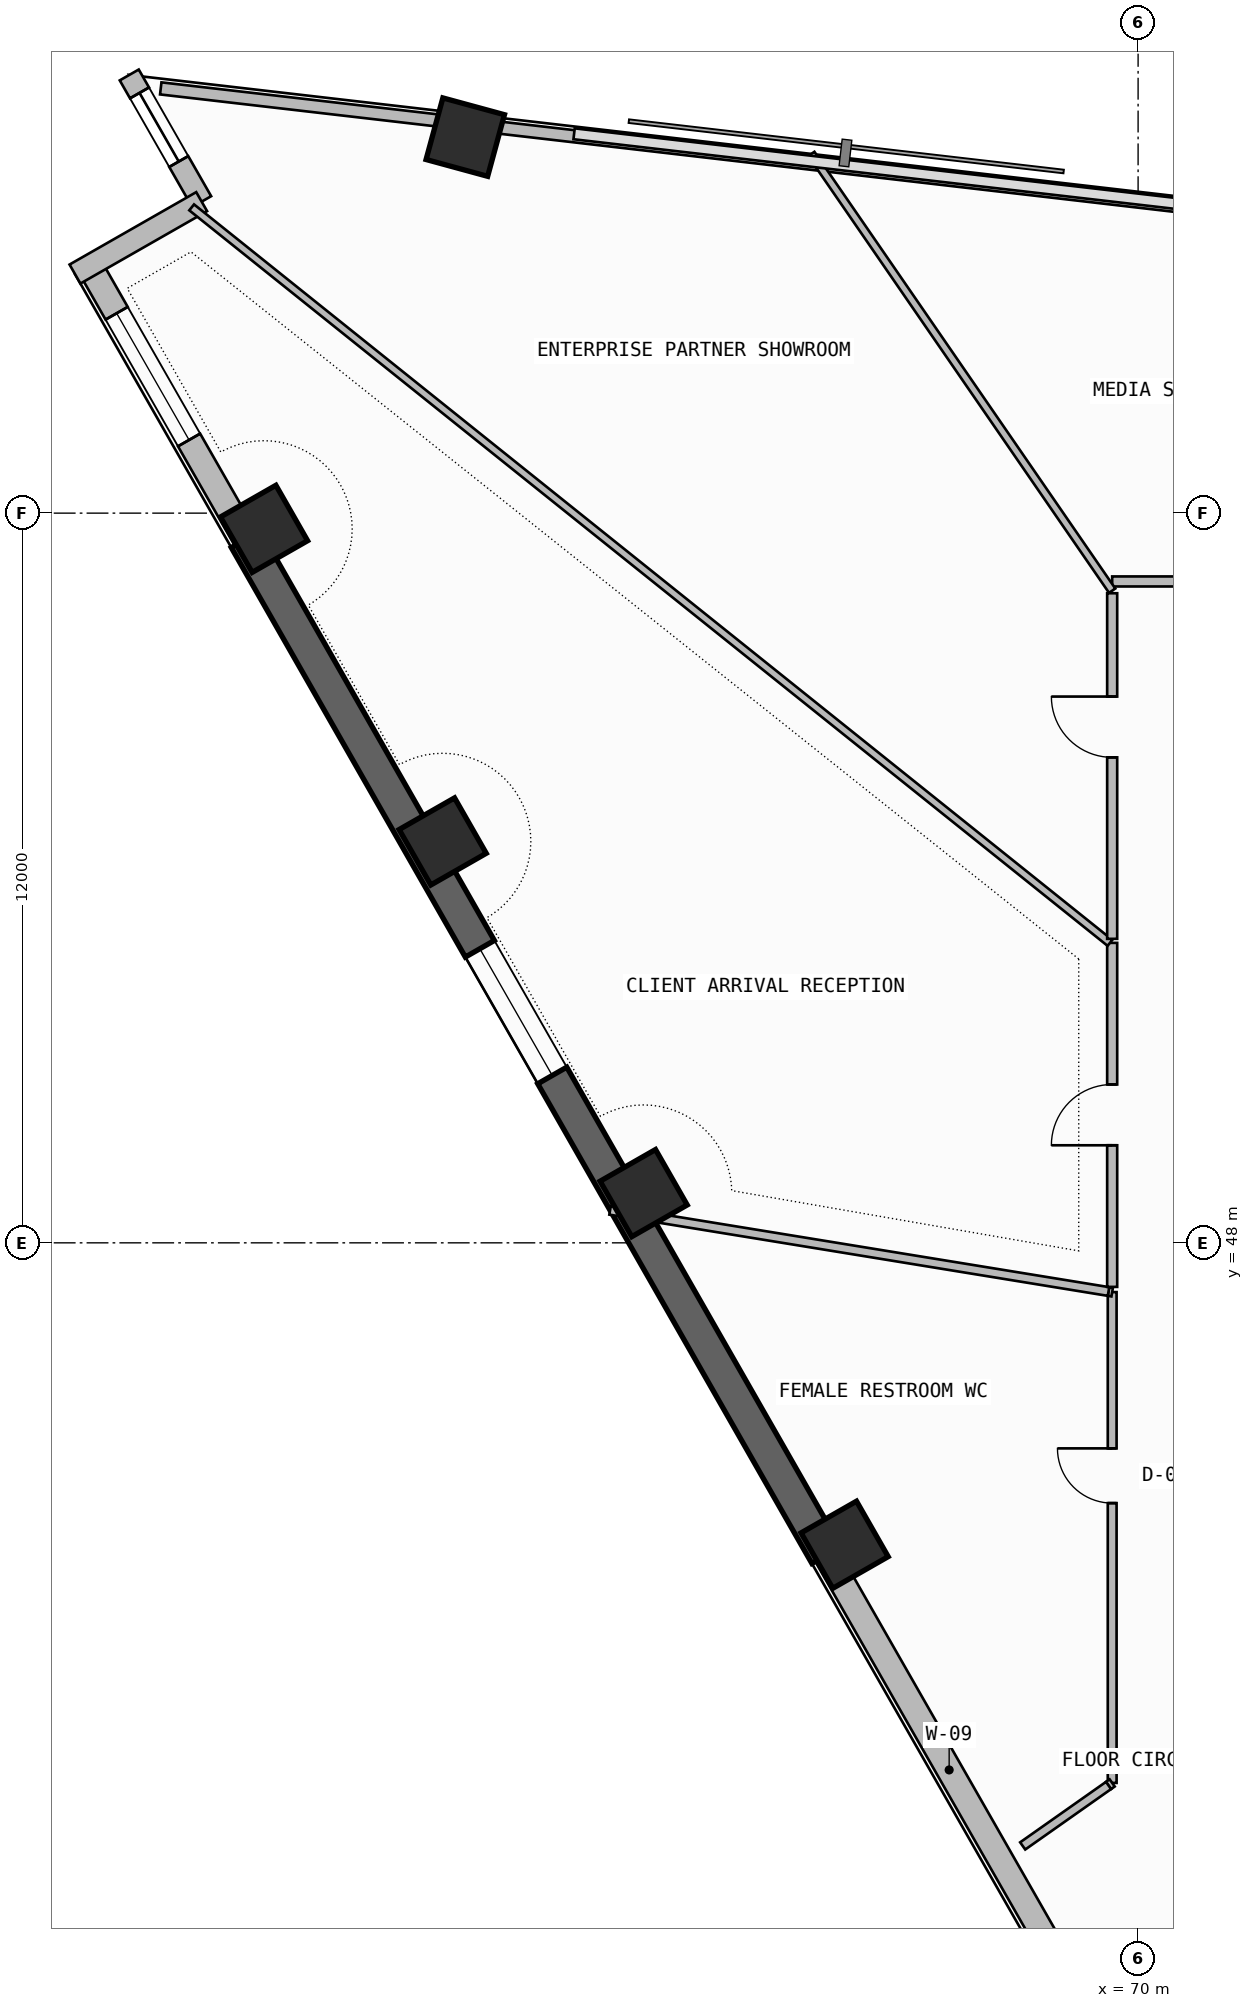
"""IFC4 building model, lengths in metres.
Left out: names, types, materials, properties, quantities, classifications, styles, units other than length and angle.
Written with IfcOpenShell. Run it as: python <this file> out.ifc"""

import sys

from ifc_helpers import new_model, si_unit, direction, frame, frame_2d, origin, origin_2d, place, context, subcontext, project, spatial, rectangle, extrude, element, fill, save


model = new_model("IFC4")
c1 = context("Model", 3, precision=1e-05, world=origin(), true_north=direction((0.0, 1.0)))
c2 = subcontext(c1, "Body", "Model", "MODEL_VIEW")
j1 = project(units=[si_unit("LENGTHUNIT", "METRE"), si_unit("PLANEANGLEUNIT", "RADIAN")], contexts=[c1])
p1 = place(None, origin())
s1 = spatial("IfcSite", under=j1, at=p1, CompositionType="ELEMENT")
p2 = place(p1, origin())
s2 = spatial("IfcBuilding", under=s1, at=p2, CompositionType="ELEMENT")
p3 = place(p2, frame((0.0, 0.0, 207.94)))
s3 = spatial("IfcBuildingStorey", under=s2, at=p3, CompositionType="ELEMENT", Elevation=207.94)
for number, where, z_axis, x_axis in (
    (1, (58.934, 66.184, 0.0), (0.0, 0.0, 1.0), (0.263, 0.965, 0.0)),
    (2, (55.625, 59.742, 0.0), (0.0, 0.0, 1.0), (-0.496, 0.868, 0.0)),
    (3, (58.563, 54.601, 0.0), (0.0, 0.0, 1.0), (-0.496, 0.868, 0.0)),
    (4, (61.868, 48.818, 0.0), (0.0, 0.0, 1.0), (-0.496, 0.868, 0.0)),
    (5, (65.173, 43.035, 0.0), (0.0, 0.0, 1.0), (-0.496, 0.868, 0.0)),
):
    element("IfcColumn", number, at=place(p3, frame(where, z_axis=z_axis, x_axis=x_axis)), inside=s3, PredefinedType="COLUMN", context=c2, shape_type="SweptSolid", body=[
        extrude(rectangle(XDim=1.05, YDim=1.05, at=origin_2d()), origin(), (0.0, 0.0, 1.0), 3.52),
    ])
p4 = place(p3, frame((52.754, 64.068, 0.0), z_axis=(0.0, 0.0, 1.0), x_axis=(0.496209984367, -0.868202540548, 0.0)))
e6 = element("IfcWall", 6, at=p4, inside=s3, PredefinedType="SOLIDWALL", context=c2, shape_type="SweptSolid", body=[
    extrude(rectangle(XDim=5.181, YDim=0.42, at=frame_2d((2.59, 0.0))), origin(), (0.0, 0.0, 1.0), 2.645),
])
p5 = place(p4, frame((0.9, 0.0, 1.1)))
e7 = element("IfcOpeningElement", 7, at=p5, cuts=e6, PredefinedType="OPENING", context=c2, shape_type="SweptSolid", body=[
    extrude(rectangle(XDim=2.4, YDim=1.2, at=frame_2d((1.2, 0.6))), frame((0.0, 0.22, 0.0), z_axis=(0.0, -1.0, 0.0), x_axis=(1.0, 0.0, 0.0)), (0.0, 0.0, 1.0), 0.44),
])
p6 = place(p3, frame((55.325, 59.57, -0.26), z_axis=(0.0, 0.0, 1.0), x_axis=(0.496211351597, -0.868201759124, 0.0)))
e8 = element("IfcWall", 8, at=p6, inside=s3, PredefinedType="SHEAR", context=c2, shape_type="SweptSolid", body=[
    extrude(rectangle(XDim=19.243, YDim=0.55, at=frame_2d((9.622, 0.0))), origin(), (0.0, 0.0, 1.0), 3.52),
])
p7 = place(p6, frame((7.757, 0.0, 1.1)))
e9 = element("IfcOpeningElement", 9, at=p7, cuts=e8, PredefinedType="OPENING", context=c2, shape_type="SweptSolid", body=[
    extrude(rectangle(XDim=2.4, YDim=1.2, at=frame_2d((1.2, 0.6))), frame((0.0, 0.285, 0.0), z_axis=(0.0, -1.0, 0.0), x_axis=(1.0, 0.0, 0.0)), (0.0, 0.0, 1.0), 0.57),
])
p8 = place(p3, frame((64.874, 42.864, 0.0), z_axis=(0.0, 0.0, 1.0), x_axis=(0.49622043329, -0.868196568517, 0.0)))
e10 = element("IfcWall", 10, at=p8, inside=s3, PredefinedType="SOLIDWALL", context=c2, shape_type="SweptSolid", body=[
    extrude(rectangle(XDim=12.582, YDim=0.42, at=frame_2d((6.291, 0.0))), origin(), (0.0, 0.0, 1.0), 2.645),
])
p9 = place(p8, frame((8.136, 0.0, 1.1)))
e11 = element("IfcOpeningElement", 11, at=p9, cuts=e10, PredefinedType="OPENING", context=c2, shape_type="SweptSolid", body=[
    extrude(rectangle(XDim=2.4, YDim=1.2, at=frame_2d((1.2, 0.6))), frame((0.0, 0.22, 0.0), z_axis=(0.0, -1.0, 0.0), x_axis=(1.0, 0.0, 0.0)), (0.0, 0.0, 1.0), 0.44),
])
p10 = place(p3, frame((53.408, 67.206, 0.0), z_axis=(0.0, 0.0, 1.0), x_axis=(0.496292324652, -0.868155474838, 0.0)))
e12 = element("IfcWall", 12, at=p10, inside=s3, PredefinedType="SOLIDWALL", context=c2, shape_type="SweptSolid", body=[
    extrude(rectangle(XDim=2.4, YDim=0.36, at=frame_2d((1.2, 0.0))), origin(), (0.0, 0.0, 1.0), 3.26),
])
p11 = place(p10, frame((0.34, 0.0, 0.45)))
e13 = element("IfcOpeningElement", 13, at=p11, cuts=e12, PredefinedType="OPENING", context=c2, shape_type="SweptSolid", body=[
    extrude(rectangle(XDim=1.3, YDim=2.4, at=frame_2d((0.65, 1.2))), frame((0.0, 0.19, 0.0), z_axis=(0.0, -1.0, 0.0), x_axis=(1.0, 0.0, 0.0)), (0.0, 0.0, 1.0), 0.38),
])
p12 = place(p3, frame((54.599, 65.123, 0.0), z_axis=(0.0, 0.0, 1.0), x_axis=(-0.86818053093, -0.4962484919, 0.0)))
e14 = element("IfcWall", 14, at=p12, inside=s3, PredefinedType="SOLIDWALL", context=c2, shape_type="SweptSolid", body=[
    extrude(rectangle(XDim=2.4, YDim=0.36, at=frame_2d((1.2, 0.0))), origin(), (0.0, 0.0, 1.0), 3.26),
])
p13 = place(p3, frame((85.424, 63.338, 0.0), z_axis=(0.0, 0.0, 1.0), x_axis=(-0.993364714048, 0.115006716693, 0.0)))
e15 = element("IfcWall", 15, at=p13, inside=s3, PredefinedType="PARAPET", context=c2, shape_type="SweptSolid", body=[
    extrude(rectangle(XDim=26.302, YDim=0.2, at=frame_2d((13.151, 0.0))), origin(), (0.0, 0.0, 1.0), 1.15),
])
p14 = place(p3, frame((58.622, 66.441, 0.0), z_axis=(0.0, 0.0, 1.0), x_axis=(-0.993362937665, 0.115022059074, 0.0)))
e16 = element("IfcWall", 16, at=p14, inside=s3, PredefinedType="PARAPET", context=c2, shape_type="SweptSolid", body=[
    extrude(rectangle(XDim=4.727, YDim=0.2, at=frame_2d((2.364, 0.0))), origin(), (0.0, 0.0, 1.0), 1.15),
])
p15 = place(p3, frame((69.573, 47.19, 0.0), z_axis=(0.0, 0.0, 1.0), x_axis=(0.0, -1.0, 0.0)))
e17 = element("IfcWall", 17, at=p15, inside=s3, PredefinedType="PARTITIONING", context=c2, shape_type="SweptSolid", body=[
    extrude(rectangle(XDim=8.072, YDim=0.145, at=frame_2d((4.036, 0.0))), origin(), (0.0, 0.0, 1.0), 3.26),
])
p16 = place(p15, frame((2.57, 0.0, 0.0)))
e18 = element("IfcOpeningElement", 18, at=p16, cuts=e17, PredefinedType="OPENING", context=c2, shape_type="SweptSolid", body=[
    extrude(rectangle(XDim=0.9, YDim=2.1, at=frame_2d((0.45, 1.05))), frame((0.0, 0.083, 0.0), z_axis=(0.0, -1.0, 0.0), x_axis=(1.0, 0.0, 0.0)), (0.0, 0.0, 1.0), 0.165),
])
p17 = place(p3, frame((69.573, 39.118, 0.0), z_axis=(0.0, 0.0, 1.0), x_axis=(-0.816875450408, -0.576814093553, 0.0)))
e19 = element("IfcWall", 19, at=p17, inside=s3, PredefinedType="PARTITIONING", context=c2, shape_type="SweptSolid", body=[
    extrude(rectangle(XDim=0.073, YDim=0.145, at=frame_2d((0.037, 0.0))), origin(), (0.0, 0.0, 1.0), 3.26),
])
p18 = place(p3, frame((69.514, 47.2, 0.0), z_axis=(0.0, 0.0, 1.0), x_axis=(0.984945018138, -0.172867901143, 0.0)))
e20 = element("IfcWall", 20, at=p18, inside=s3, PredefinedType="PARTITIONING", context=c2, shape_type="SweptSolid", body=[
    extrude(rectangle(XDim=0.061, YDim=0.145, at=frame_2d((0.03, 0.0))), origin(), (0.0, 0.0, 1.0), 3.26),
])
p19 = place(p3, frame((61.315, 48.535, 0.0), z_axis=(0.0, 0.0, 1.0), x_axis=(0.986985580166, -0.160808782545, 0.0)))
e21 = element("IfcWall", 21, at=p19, inside=s3, PredefinedType="PARTITIONING", context=c2, shape_type="SweptSolid", body=[
    extrude(rectangle(XDim=8.306, YDim=0.145, at=frame_2d((4.153, 0.0))), origin(), (0.0, 0.0, 1.0), 2.645),
])
p20 = place(p3, frame((77.35, 58.876, 0.0), z_axis=(0.0, 0.0, 1.0), x_axis=(-1.0, 0.0, 0.0)))
e22 = element("IfcWall", 22, at=p20, inside=s3, PredefinedType="PARTITIONING", context=c2, shape_type="SweptSolid", body=[
    extrude(rectangle(XDim=7.777, YDim=0.165, at=frame_2d((3.888, 0.0))), origin(), (0.0, 0.0, 1.0), 3.26),
])
p21 = place(p20, frame((1.603, 0.0, 0.0)))
e23 = element("IfcOpeningElement", 23, at=p21, cuts=e22, PredefinedType="OPENING", context=c2, shape_type="SweptSolid", body=[
    extrude(rectangle(XDim=1.0, YDim=2.2, at=frame_2d((0.5, 1.1))), frame((0.0, 0.093, 0.0), z_axis=(0.0, -1.0, 0.0), x_axis=(1.0, 0.0, 0.0)), (0.0, 0.0, 1.0), 0.185),
])
p22 = place(p3, frame((69.573, 58.724, 0.0), z_axis=(0.0, 0.0, 1.0), x_axis=(-0.567314937792, 0.823500917643, 0.0)))
e24 = element("IfcWall", 24, at=p22, inside=s3, PredefinedType="PARTITIONING", context=c2, shape_type="SweptSolid", body=[
    extrude(rectangle(XDim=8.723, YDim=0.125, at=frame_2d((4.361, 0.0))), origin(), (0.0, 0.0, 1.0), 3.26),
])
p23 = place(p3, frame((69.573, 52.933, 0.0), z_axis=(0.0, 0.0, 1.0), x_axis=(0.0, -1.0, 0.0)))
e25 = element("IfcWall", 25, at=p23, inside=s3, PredefinedType="PARTITIONING", context=c2, shape_type="SweptSolid", body=[
    extrude(rectangle(XDim=5.657, YDim=0.165, at=frame_2d((2.829, 0.0))), origin(), (0.0, 0.0, 1.0), 2.745),
])
p24 = place(p23, frame((2.329, 0.0, 0.0)))
e26 = element("IfcOpeningElement", 26, at=p24, cuts=e25, PredefinedType="OPENING", context=c2, shape_type="SweptSolid", body=[
    extrude(rectangle(XDim=1.0, YDim=2.2, at=frame_2d((0.5, 1.1))), frame((0.0, 0.093, 0.0), z_axis=(0.0, -1.0, 0.0), x_axis=(1.0, 0.0, 0.0)), (0.0, 0.0, 1.0), 0.185),
])
p25 = place(p3, frame((54.434, 65.029, 0.0), z_axis=(0.0, 0.0, 1.0), x_axis=(0.780535102031, -0.625111953572, 0.0)))
e27 = element("IfcWall", 27, at=p25, inside=s3, PredefinedType="PARTITIONING", context=c2, shape_type="SweptSolid", body=[
    extrude(rectangle(XDim=19.349, YDim=0.125, at=frame_2d((9.675, 0.0))), origin(), (0.0, 0.0, 1.0), 2.645),
])
p26 = place(p3, frame((69.573, 58.683, 0.0), z_axis=(0.0, 0.0, 1.0), x_axis=(0.0, -1.0, 0.0)))
e28 = element("IfcWall", 28, at=p26, inside=s3, PredefinedType="PARTITIONING", context=c2, shape_type="SweptSolid", body=[
    extrude(rectangle(XDim=5.683, YDim=0.165, at=frame_2d((2.842, 0.0))), origin(), (0.0, 0.0, 1.0), 2.745),
])
p27 = place(p26, frame((1.699, 0.0, 0.0)))
e29 = element("IfcOpeningElement", 29, at=p27, cuts=e28, PredefinedType="OPENING", context=c2, shape_type="SweptSolid", body=[
    extrude(rectangle(XDim=1.0, YDim=2.2, at=frame_2d((0.5, 1.1))), frame((0.0, 0.093, 0.0), z_axis=(0.0, -1.0, 0.0), x_axis=(1.0, 0.0, 0.0)), (0.0, 0.0, 1.0), 0.185),
])
p28 = place(p3, frame((69.514, 39.076, 0.0), z_axis=(0.0, 0.0, 1.0), x_axis=(-0.817660956393, -0.575700061134, 0.0)))
e30 = element("IfcWall", 30, at=p28, inside=s3, PredefinedType="PARTITIONING", context=c2, shape_type="SweptSolid", body=[
    extrude(rectangle(XDim=1.726, YDim=0.145, at=frame_2d((0.863, 0.0))), origin(), (0.0, 0.0, 1.0), 3.26),
])
p29 = place(p5, origin())
e31 = element("IfcWindow", 31, at=p29, inside=s3, PartitioningType="SINGLE_PANEL", PredefinedType="WINDOW", context=c2, shape_type="SweptSolid", body=[
    extrude(rectangle(XDim=2.4, YDim=1.2, at=frame_2d((1.2, 0.6))), frame((0.0, 0.03, 0.0), z_axis=(0.0, -1.0, 0.0), x_axis=(1.0, 0.0, 0.0)), (0.0, 0.0, 1.0), 0.06),
])
fill(e7, e31)
p30 = place(p7, origin())
e32 = element("IfcWindow", 32, at=p30, inside=s3, PartitioningType="SINGLE_PANEL", PredefinedType="WINDOW", context=c2, shape_type="SweptSolid", body=[
    extrude(rectangle(XDim=2.4, YDim=1.2, at=frame_2d((1.2, 0.6))), frame((0.0, 0.03, 0.0), z_axis=(0.0, -1.0, 0.0), x_axis=(1.0, 0.0, 0.0)), (0.0, 0.0, 1.0), 0.06),
])
fill(e9, e32)
p31 = place(p11, origin())
e33 = element("IfcWindow", 33, at=p31, inside=s3, PartitioningType="SINGLE_PANEL", PredefinedType="WINDOW", context=c2, shape_type="SweptSolid", body=[
    extrude(rectangle(XDim=1.3, YDim=2.4, at=frame_2d((0.65, 1.2))), frame((0.0, 0.03, 0.0), z_axis=(0.0, -1.0, 0.0), x_axis=(1.0, 0.0, 0.0)), (0.0, 0.0, 1.0), 0.06),
])
fill(e13, e33)
p32 = place(p16, frame((0.9, 0.0, 0.0), z_axis=(0.0, 0.0, 1.0), x_axis=(-1.0, 0.0, 0.0)))
e34 = element("IfcDoor", 34, at=p32, inside=s3, OperationType="SINGLE_SWING_RIGHT", PredefinedType="DOOR", context=c2, shape_type="SweptSolid", body=[
    extrude(rectangle(XDim=0.9, YDim=2.1, at=frame_2d((0.45, 1.05))), frame((0.0, 0.025, 0.0), z_axis=(0.0, -1.0, 0.0), x_axis=(1.0, 0.0, 0.0)), (0.0, 0.0, 1.0), 0.05),
])
fill(e18, e34)
p33 = place(p24, frame((1.0, 0.0, 0.0), z_axis=(0.0, 0.0, 1.0), x_axis=(-1.0, 0.0, 0.0)))
e35 = element("IfcDoor", 35, at=p33, inside=s3, OperationType="SINGLE_SWING_LEFT", PredefinedType="DOOR", context=c2, shape_type="SweptSolid", body=[
    extrude(rectangle(XDim=1.0, YDim=2.2, at=frame_2d((0.5, 1.1))), frame((0.0, 0.025, 0.0), z_axis=(0.0, -1.0, 0.0), x_axis=(1.0, 0.0, 0.0)), (0.0, 0.0, 1.0), 0.05),
])
fill(e26, e35)
p34 = place(p27, frame((1.0, 0.0, 0.0), z_axis=(0.0, 0.0, 1.0), x_axis=(-1.0, 0.0, 0.0)))
e36 = element("IfcDoor", 36, at=p34, inside=s3, OperationType="SINGLE_SWING_RIGHT", PredefinedType="DOOR", context=c2, shape_type="SweptSolid", body=[
    extrude(rectangle(XDim=1.0, YDim=2.2, at=frame_2d((0.5, 1.1))), frame((0.0, 0.025, 0.0), z_axis=(0.0, -1.0, 0.0), x_axis=(1.0, 0.0, 0.0)), (0.0, 0.0, 1.0), 0.05),
])
fill(e29, e36)
save(model, sys.argv[1])
